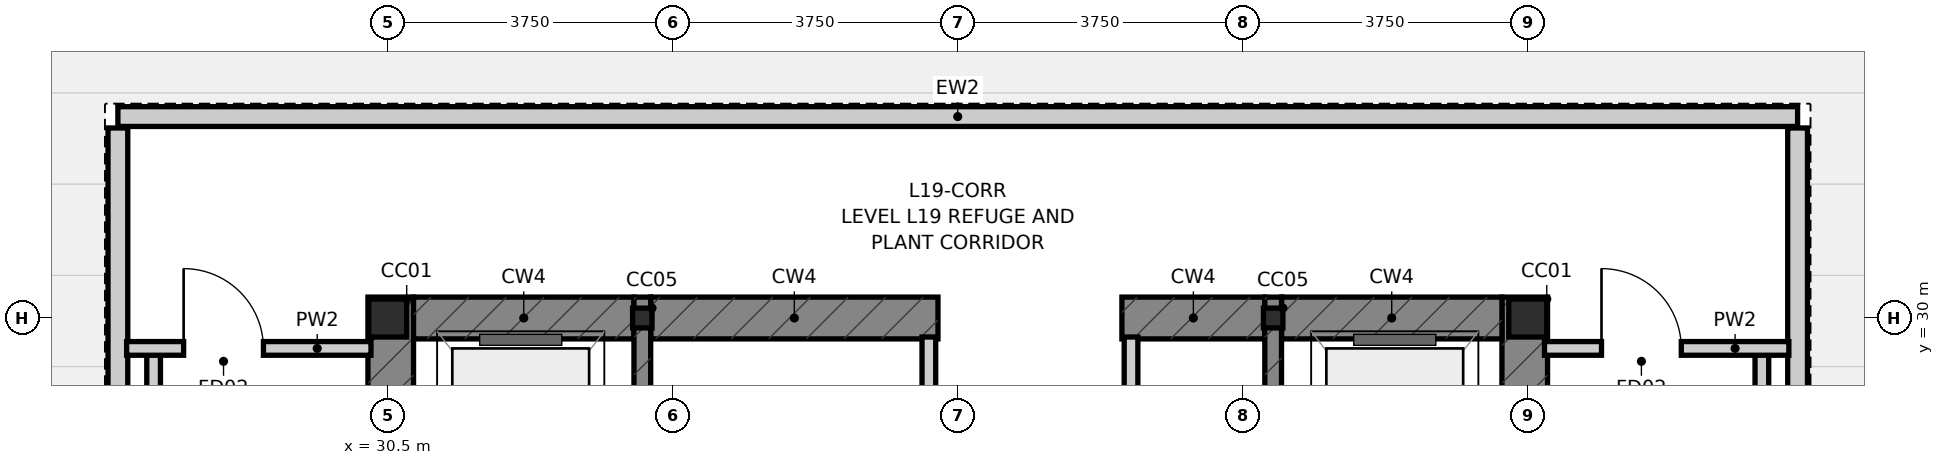
"""IFC4 building model, lengths in metres.
Left out: names, types, materials, properties, quantities, classifications, styles, units other than length and angle.
Written with IfcOpenShell. Run it as: python <this file> out.ifc"""

import sys

from ifc_helpers import new_model, si_unit, direction, frame, frame_2d, origin, origin_2d, place, context, subcontext, project, spatial, rectangle, i_section, extrude, source, transform, mapped, element, fill, save


model = new_model("IFC4")
c1 = context("Model", 3, precision=1e-05, world=origin(), true_north=direction((0.0, 1.0)))
c2 = subcontext(c1, "Body", "Model", "MODEL_VIEW")
j1 = project(units=[si_unit("LENGTHUNIT", "METRE"), si_unit("PLANEANGLEUNIT", "RADIAN")], contexts=[c1])
p1 = place(None, origin())
s1 = spatial("IfcSite", under=j1, at=p1, CompositionType="ELEMENT")
p2 = place(p1, origin())
s2 = spatial("IfcBuilding", under=s1, at=p2, CompositionType="ELEMENT")
p3 = place(p2, frame((0.0, 0.0, 75.05)))
s3 = spatial("IfcBuildingStorey", under=s2, at=p3, CompositionType="ELEMENT", Elevation=75.05)
m1 = source(origin(), c2, "Body", "SweptSolid", [
    extrude(i_section(OverallWidth=0.5, OverallDepth=0.5, WebThickness=0.028, FlangeThickness=0.04, at=origin_2d()), origin(), (0.0, 0.0, 1.0), 4.8),
])
for number, where, z_axis, x_axis in (
    (1, (45.5, 30.0, 0.0), (0.0, 0.0, 1.0), (1.0, 0.0, 0.0)),
    (2, (30.5, 30.0, 0.0), (0.0, 0.0, 1.0), (1.0, 0.0, 0.0)),
):
    element("IfcColumn", number, at=place(p3, frame(where, z_axis=z_axis, x_axis=x_axis)), inside=s3, PredefinedType="COLUMN", context=c2, shape_type="MappedRepresentation", body=[
        mapped(m1, transform((0.0, 0.0, 0.0), scale=1.0)),
    ])
m2 = source(origin(), c2, "Body", "SweptSolid", [
    extrude(i_section(OverallWidth=0.256, OverallDepth=0.26, WebThickness=0.01, FlangeThickness=0.017, at=origin_2d()), origin(), (0.0, 0.0, 1.0), 4.8),
])
for number, where, z_axis, x_axis in (
    (3, (33.85, 30.0, 0.0), (0.0, 0.0, 1.0), (1.0, 0.0, 0.0)),
    (4, (42.15, 30.0, 0.0), (0.0, 0.0, 1.0), (1.0, 0.0, 0.0)),
):
    element("IfcColumn", number, at=place(p3, frame(where, z_axis=z_axis, x_axis=x_axis)), inside=s3, PredefinedType="COLUMN", context=c2, shape_type="MappedRepresentation", body=[
        mapped(m2, transform((0.0, 0.0, 0.0), scale=1.0)),
    ])
p4 = place(p3, frame((30.54, 16.85, 0.0), z_axis=(0.0, 0.0, 1.0), x_axis=(0.0, 1.0, 0.0)))
e5 = element("IfcWall", 5, at=p4, inside=s3, PredefinedType="SHEAR", context=c2, shape_type="SweptSolid", body=[
    extrude(rectangle(XDim=13.425, YDim=0.6, at=frame_2d((6.712, 0.0))), origin(), (0.0, 0.0, 1.0), 4.8),
])
p5 = place(p4, frame((6.5, 0.0, 0.0)))
e6 = element("IfcOpeningElement", 6, at=p5, cuts=e5, PredefinedType="OPENING", context=c2, shape_type="SweptSolid", body=[
    extrude(rectangle(XDim=1.12, YDim=2.15, at=frame_2d((0.56, 1.075))), frame((0.0, 0.312, 0.0), z_axis=(0.0, -1.0, 0.0), x_axis=(1.0, 0.0, 0.0)), (0.0, 0.0, 1.0), 0.624),
])
p6 = place(p4, frame((10.95, 0.0, 0.0)))
e7 = element("IfcOpeningElement", 7, at=p6, cuts=e5, PredefinedType="OPENING", context=c2, shape_type="SweptSolid", body=[
    extrude(rectangle(XDim=1.2, YDim=2.2, at=frame_2d((0.6, 1.1))), frame((0.0, 0.312, 0.0), z_axis=(0.0, -1.0, 0.0), x_axis=(1.0, 0.0, 0.0)), (0.0, 0.0, 1.0), 0.624),
])
p7 = place(p3, frame((45.46, 16.85, 0.0), z_axis=(0.0, 0.0, 1.0), x_axis=(0.0, 1.0, 0.0)))
e8 = element("IfcWall", 8, at=p7, inside=s3, PredefinedType="SHEAR", context=c2, shape_type="SweptSolid", body=[
    extrude(rectangle(XDim=13.425, YDim=0.6, at=frame_2d((6.712, 0.0))), origin(), (0.0, 0.0, 1.0), 4.8),
])
p8 = place(p7, frame((6.5, 0.0, 0.0)))
e9 = element("IfcOpeningElement", 9, at=p8, cuts=e8, PredefinedType="OPENING", context=c2, shape_type="SweptSolid", body=[
    extrude(rectangle(XDim=1.12, YDim=2.15, at=frame_2d((0.56, 1.075))), frame((0.0, 0.312, 0.0), z_axis=(0.0, -1.0, 0.0), x_axis=(1.0, 0.0, 0.0)), (0.0, 0.0, 1.0), 0.624),
])
p9 = place(p7, frame((10.95, 0.0, 0.0)))
e10 = element("IfcOpeningElement", 10, at=p9, cuts=e8, PredefinedType="OPENING", context=c2, shape_type="SweptSolid", body=[
    extrude(rectangle(XDim=1.2, YDim=2.2, at=frame_2d((0.6, 1.1))), frame((0.0, 0.312, 0.0), z_axis=(0.0, -1.0, 0.0), x_axis=(1.0, 0.0, 0.0)), (0.0, 0.0, 1.0), 0.624),
])
p10 = place(p3, frame((30.84, 30.0, 0.0), z_axis=(0.0, 0.0, 1.0), x_axis=(1.0, 0.0, 0.0)))
e11 = element("IfcWall", 11, at=p10, inside=s3, PredefinedType="SHEAR", context=c2, shape_type="SweptSolid", body=[
    extrude(rectangle(XDim=2.9, YDim=0.55, at=frame_2d((1.45, 0.0))), origin(), (0.0, 0.0, 1.0), 4.8),
])
p11 = place(p3, frame((33.96, 30.0, 0.0), z_axis=(0.0, 0.0, 1.0), x_axis=(1.0, 0.0, 0.0)))
e12 = element("IfcWall", 12, at=p11, inside=s3, PredefinedType="SHEAR", context=c2, shape_type="SweptSolid", body=[
    extrude(rectangle(XDim=3.78, YDim=0.55, at=frame_2d((1.89, 0.0))), origin(), (0.0, 0.0, 1.0), 4.8),
])
p12 = place(p3, frame((40.16, 30.0, 0.0), z_axis=(0.0, 0.0, 1.0), x_axis=(1.0, 0.0, 0.0)))
e13 = element("IfcWall", 13, at=p12, inside=s3, PredefinedType="SHEAR", context=c2, shape_type="SweptSolid", body=[
    extrude(rectangle(XDim=1.88, YDim=0.55, at=frame_2d((0.94, 0.0))), origin(), (0.0, 0.0, 1.0), 4.8),
])
p13 = place(p3, frame((42.26, 30.0, 0.0), z_axis=(0.0, 0.0, 1.0), x_axis=(1.0, 0.0, 0.0)))
e14 = element("IfcWall", 14, at=p13, inside=s3, PredefinedType="SHEAR", context=c2, shape_type="SweptSolid", body=[
    extrude(rectangle(XDim=2.9, YDim=0.55, at=frame_2d((1.45, 0.0))), origin(), (0.0, 0.0, 1.0), 4.8),
])
for number, where, z_axis, x_axis in (
    (15, (33.85, 16.85, 0.0), (0.0, 0.0, 1.0), (0.0, 1.0, 0.0)),
    (16, (42.15, 16.85, 0.0), (0.0, 0.0, 1.0), (0.0, 1.0, 0.0)),
):
    element("IfcWall", number, at=place(p3, frame(where, z_axis=z_axis, x_axis=x_axis)), inside=s3, PredefinedType="SHEAR", context=c2, shape_type="SweptSolid", body=[
        extrude(rectangle(XDim=13.425, YDim=0.22, at=frame_2d((6.712, 0.0))), origin(), (0.0, 0.0, 1.0), 4.8),
    ])
p14 = place(p3, frame((26.95, 32.65, 0.0), z_axis=(0.0, 0.0, 1.0), x_axis=(1.0, 0.0, 0.0)))
e17 = element("IfcWall", 17, at=p14, inside=s3, PredefinedType="STANDARD", context=c2, shape_type="SweptSolid", body=[
    extrude(rectangle(XDim=22.1, YDim=0.26, at=frame_2d((11.05, 0.0))), origin(), (0.0, 0.0, 1.0), 4.176),
])
p15 = place(p3, frame((26.95, 15.5, 0.0), z_axis=(0.0, 0.0, 1.0), x_axis=(0.0, 1.0, 0.0)))
e18 = element("IfcWall", 18, at=p15, inside=s3, PredefinedType="STANDARD", context=c2, shape_type="SweptSolid", body=[
    extrude(rectangle(XDim=17.0, YDim=0.26, at=frame_2d((8.5, 0.0))), origin(), (0.0, 0.0, 1.0), 4.176),
])
p16 = place(p15, frame((3.5, 0.0, 0.0)))
e19 = element("IfcOpeningElement", 19, at=p16, cuts=e18, PredefinedType="OPENING", context=c2, shape_type="SweptSolid", body=[
    extrude(rectangle(XDim=1.1, YDim=2.2, at=frame_2d((0.55, 1.1))), frame((0.0, 0.142, 0.0), z_axis=(0.0, -1.0, 0.0), x_axis=(1.0, 0.0, 0.0)), (0.0, 0.0, 1.0), 0.284),
])
p17 = place(p3, frame((49.05, 15.5, 0.0), z_axis=(0.0, 0.0, 1.0), x_axis=(0.0, 1.0, 0.0)))
e20 = element("IfcWall", 20, at=p17, inside=s3, PredefinedType="STANDARD", context=c2, shape_type="SweptSolid", body=[
    extrude(rectangle(XDim=17.0, YDim=0.26, at=frame_2d((8.5, 0.0))), origin(), (0.0, 0.0, 1.0), 4.176),
])
p18 = place(p17, frame((3.5, 0.0, 0.0)))
e21 = element("IfcOpeningElement", 21, at=p18, cuts=e20, PredefinedType="OPENING", context=c2, shape_type="SweptSolid", body=[
    extrude(rectangle(XDim=1.1, YDim=2.2, at=frame_2d((0.55, 1.1))), frame((0.0, 0.142, 0.0), z_axis=(0.0, -1.0, 0.0), x_axis=(1.0, 0.0, 0.0)), (0.0, 0.0, 1.0), 0.284),
])
for number, where, z_axis, x_axis in (
    (22, (37.62, 27.64, 0.0), (0.0, 0.0, 1.0), (0.0, 1.0, 0.0)),
    (23, (40.28, 27.64, 0.0), (0.0, 0.0, 1.0), (0.0, 1.0, 0.0)),
):
    element("IfcWall", number, at=place(p3, frame(where, z_axis=z_axis, x_axis=x_axis)), inside=s3, PredefinedType="PARTITIONING", context=c2, shape_type="SweptSolid", body=[
        extrude(rectangle(XDim=2.11, YDim=0.18, at=frame_2d((1.055, 0.0))), origin(), (0.0, 0.0, 1.0), 4.55),
    ])
p19 = place(p3, frame((27.42, 23.2, 0.0), z_axis=(0.0, 0.0, 1.0), x_axis=(0.0, 1.0, 0.0)))
e24 = element("IfcWall", 24, at=p19, inside=s3, PredefinedType="PARTITIONING", context=c2, shape_type="SweptSolid", body=[
    extrude(rectangle(XDim=6.4, YDim=0.18, at=frame_2d((3.2, 0.0))), origin(), (0.0, 0.0, 1.0), 4.176),
])
p20 = place(p3, frame((27.065, 29.6, 0.0), z_axis=(0.0, 0.0, 1.0), x_axis=(1.0, 0.0, 0.0)))
e25 = element("IfcWall", 25, at=p20, inside=s3, PredefinedType="PARTITIONING", context=c2, shape_type="SweptSolid", body=[
    extrude(rectangle(XDim=3.215, YDim=0.18, at=frame_2d((1.607, 0.0))), origin(), (0.0, 0.0, 1.0), 3.933),
])
p21 = place(p20, frame((0.75, 0.0, 0.0)))
e26 = element("IfcOpeningElement", 26, at=p21, cuts=e25, PredefinedType="OPENING", context=c2, shape_type="SweptSolid", body=[
    extrude(rectangle(XDim=1.05, YDim=2.15, at=frame_2d((0.525, 1.075))), frame((0.0, 0.102, 0.0), z_axis=(0.0, -1.0, 0.0), x_axis=(1.0, 0.0, 0.0)), (0.0, 0.0, 1.0), 0.204),
])
p22 = place(p3, frame((48.58, 23.2, 0.0), z_axis=(0.0, 0.0, 1.0), x_axis=(0.0, 1.0, 0.0)))
e27 = element("IfcWall", 27, at=p22, inside=s3, PredefinedType="PARTITIONING", context=c2, shape_type="SweptSolid", body=[
    extrude(rectangle(XDim=6.4, YDim=0.18, at=frame_2d((3.2, 0.0))), origin(), (0.0, 0.0, 1.0), 4.176),
])
p23 = place(p3, frame((45.72, 29.6, 0.0), z_axis=(0.0, 0.0, 1.0), x_axis=(1.0, 0.0, 0.0)))
e28 = element("IfcWall", 28, at=p23, inside=s3, PredefinedType="PARTITIONING", context=c2, shape_type="SweptSolid", body=[
    extrude(rectangle(XDim=3.215, YDim=0.18, at=frame_2d((1.607, 0.0))), origin(), (0.0, 0.0, 1.0), 3.933),
])
p24 = place(p23, frame((0.75, 0.0, 0.0)))
e29 = element("IfcOpeningElement", 29, at=p24, cuts=e28, PredefinedType="OPENING", context=c2, shape_type="SweptSolid", body=[
    extrude(rectangle(XDim=1.05, YDim=2.15, at=frame_2d((0.525, 1.075))), frame((0.0, 0.102, 0.0), z_axis=(0.0, -1.0, 0.0), x_axis=(1.0, 0.0, 0.0)), (0.0, 0.0, 1.0), 0.204),
])
p25 = place(p21, origin())
e30 = element("IfcDoor", 30, at=p25, inside=s3, OperationType="SINGLE_SWING_LEFT", PredefinedType="DOOR", context=c2, shape_type="SweptSolid", body=[
    extrude(rectangle(XDim=1.05, YDim=2.15, at=frame_2d((0.525, 1.075))), frame((0.0, 0.025, 0.0), z_axis=(0.0, -1.0, 0.0), x_axis=(1.0, 0.0, 0.0)), (0.0, 0.0, 1.0), 0.05),
])
fill(e26, e30)
p26 = place(p24, origin())
e31 = element("IfcDoor", 31, at=p26, inside=s3, OperationType="SINGLE_SWING_LEFT", PredefinedType="DOOR", context=c2, shape_type="SweptSolid", body=[
    extrude(rectangle(XDim=1.05, YDim=2.15, at=frame_2d((0.525, 1.075))), frame((0.0, 0.025, 0.0), z_axis=(0.0, -1.0, 0.0), x_axis=(1.0, 0.0, 0.0)), (0.0, 0.0, 1.0), 0.05),
])
fill(e29, e31)
save(model, sys.argv[1])
